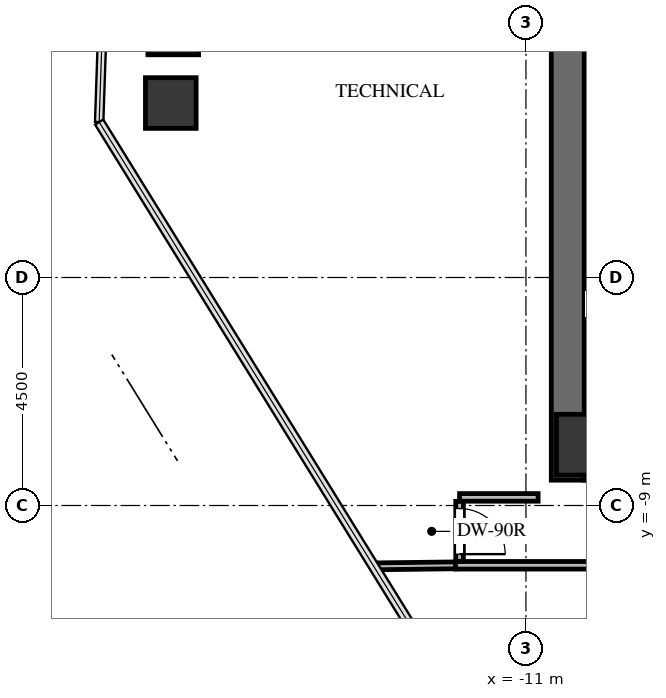
"""IFC4 building model, lengths in metres.
Left out: names, types, materials, properties, quantities, classifications, styles, units other than length and angle.
Written with IfcOpenShell. Run it as: python <this file> out.ifc"""

import sys

from ifc_helpers import new_model, si_unit, direction, frame, frame_2d, origin, origin_2d, place, context, subcontext, project, spatial, rectangle, extrude, source, transform, mapped, element, fill, save


model = new_model("IFC4")
c1 = context("Model", 3, precision=1e-05, world=origin(), true_north=direction((0.0, 1.0)))
c2 = subcontext(c1, "Body", "Model", "MODEL_VIEW")
j1 = project(units=[si_unit("LENGTHUNIT", "METRE"), si_unit("PLANEANGLEUNIT", "RADIAN")], contexts=[c1])
p1 = place(None, origin())
s1 = spatial("IfcSite", under=j1, at=p1, CompositionType="ELEMENT")
p2 = place(p1, origin())
s2 = spatial("IfcBuilding", under=s1, at=p2, CompositionType="ELEMENT")
p3 = place(p2, frame((0.0, 0.0, 170.5)))
s3 = spatial("IfcBuildingStorey", under=s2, at=p3, CompositionType="ELEMENT", Elevation=170.5)
p4 = place(p3, frame((-10.175, -8.5, 0.0), z_axis=(0.0, 0.0, 1.0), x_axis=(0.0, 1.0, 0.0)))
e1 = element("IfcWall", 1, at=p4, inside=s3, PredefinedType="SHEAR", context=c2, shape_type="SweptSolid", body=[
    extrude(rectangle(XDim=17.0, YDim=0.65, at=frame_2d((8.5, 0.0))), origin(), (0.0, 0.0, 1.0), 3.3),
])
p5 = place(p3, frame((-9.85, -8.175, 0.0), z_axis=(0.0, 0.0, 1.0), x_axis=(1.0, 0.0, 0.0)))
e2 = element("IfcWall", 2, at=p5, inside=s3, PredefinedType="SHEAR", context=c2, shape_type="SweptSolid", body=[
    extrude(rectangle(XDim=7.75, YDim=0.65, at=frame_2d((3.875, 0.0))), origin(), (0.0, 0.0, 1.0), 3.3),
])
m1 = source(origin(), c2, "Body", "SweptSolid", [
    extrude(rectangle(XDim=1.2, YDim=1.2, at=origin_2d()), origin(), (0.0, 0.0, 1.0), 3.3),
])
p6 = place(p3, frame((-9.8, -7.8, -0.24), z_axis=(0.0, 0.0, 1.0), x_axis=(1.0, 0.0, 0.0)))
e3 = element("IfcColumn", 3, at=p6, inside=s3, PredefinedType="COLUMN", context=c2, shape_type="MappedRepresentation", body=[
    mapped(m1, transform((0.0, 0.0, 0.0), x_axis=(1.0, 0.0, 0.0), y_axis=(0.0, 1.0, 0.0), z_axis=(0.0, 0.0, 1.0), scale=1.0)),
])
m2 = source(origin(), c2, "Body", "SweptSolid", [
    extrude(rectangle(XDim=1.0, YDim=1.0, at=origin_2d()), origin(), (0.0, 0.0, 1.0), 3.3),
])
for number, where, z_axis, x_axis in (
    (4, (-18.009, -1.057, -0.24), (0.0, 0.0, 1.0), (1.0, 0.0, 0.0)),
    (5, (-17.96, 0.396, -0.24), (0.0, 0.0, 1.0), (1.0, 0.0, 0.0)),
):
    element("IfcColumn", number, at=place(p3, frame(where, z_axis=z_axis, x_axis=x_axis)), inside=s3, PredefinedType="COLUMN", context=c2, shape_type="MappedRepresentation", body=[
        mapped(m2, transform((0.0, 0.0, 0.0), x_axis=(1.0, 0.0, 0.0), y_axis=(0.0, 1.0, 0.0), z_axis=(0.0, 0.0, 1.0), scale=1.0)),
    ])
p7 = place(p3, frame((-12.39, -10.18, 0.0), z_axis=(0.0, 0.0, 1.0), x_axis=(1.0, 0.0, 0.0)))
e6 = element("IfcWall", 6, at=p7, inside=s3, PredefinedType="PARTITIONING", context=c2, shape_type="SweptSolid", body=[
    extrude(rectangle(XDim=11.38, YDim=0.15, at=frame_2d((5.69, 0.0))), origin(), (0.0, 0.0, 1.0), 2.242),
])
p8 = place(p7, frame((5.215, 0.0, 0.0)))
e7 = element("IfcOpeningElement", 7, at=p8, cuts=e6, PredefinedType="OPENING", context=c2, shape_type="SweptSolid", body=[
    extrude(rectangle(XDim=0.95, YDim=2.1, at=frame_2d((0.475, 1.05))), frame((0.0, 0.085, 0.0), z_axis=(0.0, -1.0, 0.0), x_axis=(1.0, 0.0, 0.0)), (0.0, 0.0, 1.0), 0.17),
])
p9 = place(p3, frame((-10.76, -8.84, 0.0), z_axis=(0.0, 0.0, 1.0), x_axis=(-1.0, 0.0, 0.0)))
e8 = element("IfcWall", 8, at=p9, inside=s3, PredefinedType="PARTITIONING", context=c2, shape_type="SweptSolid", body=[
    extrude(rectangle(XDim=1.55, YDim=0.15, at=frame_2d((0.775, 0.0))), origin(), (0.0, 0.0, 1.0), 3.045),
])
p10 = place(p3, frame((-12.31, -8.919, 0.0), z_axis=(0.0, 0.0, 1.0), x_axis=(0.0, -1.0, 0.0)))
e9 = element("IfcWall", 9, at=p10, inside=s3, PredefinedType="PARTITIONING", context=c2, shape_type="SweptSolid", body=[
    extrude(rectangle(XDim=1.182, YDim=0.15, at=frame_2d((0.591, 0.0))), origin(), (0.0, 0.0, 1.0), 2.399),
])
p11 = place(p10, frame((0.141, 0.0, 0.0)))
e10 = element("IfcOpeningElement", 10, at=p11, cuts=e9, PredefinedType="OPENING", context=c2, shape_type="SweptSolid", body=[
    extrude(rectangle(XDim=0.9, YDim=2.05, at=frame_2d((0.45, 1.025))), frame((0.0, 0.085, 0.0), z_axis=(0.0, -1.0, 0.0), x_axis=(1.0, 0.0, 0.0)), (0.0, 0.0, 1.0), 0.17),
])
p12 = place(p3, frame((-14.004, -10.201, 0.0), z_axis=(0.0, 0.0, 1.0), x_axis=(0.999923084603, 0.012402615782, 0.0)))
e11 = element("IfcWall", 11, at=p12, inside=s3, PredefinedType="PARTITIONING", context=c2, shape_type="SweptSolid", body=[
    extrude(rectangle(XDim=1.614, YDim=0.135, at=frame_2d((0.807, 0.0))), origin(), (0.0, 0.0, 1.0), 2.399),
])
m3 = source(origin(), c2, "Body", "SweptSolid", [
    extrude(rectangle(XDim=0.9, YDim=2.05, at=frame_2d((0.45, 1.025))), frame((0.0, 0.025, 0.0), z_axis=(0.0, -1.0, 0.0), x_axis=(1.0, 0.0, 0.0)), (0.0, 0.0, 1.0), 0.05),
])
p13 = place(p11, origin())
e12 = element("IfcDoor", 12, at=p13, inside=s3, OperationType="SINGLE_SWING_RIGHT", PredefinedType="DOOR", context=c2, shape_type="MappedRepresentation", body=[
    mapped(m3, transform((0.0, 0.0, 0.0), x_axis=(1.0, 0.0, 0.0), y_axis=(0.0, 1.0, 0.0), z_axis=(0.0, 0.0, 1.0), scale=1.0)),
])
fill(e10, e12)
save(model, sys.argv[1])
